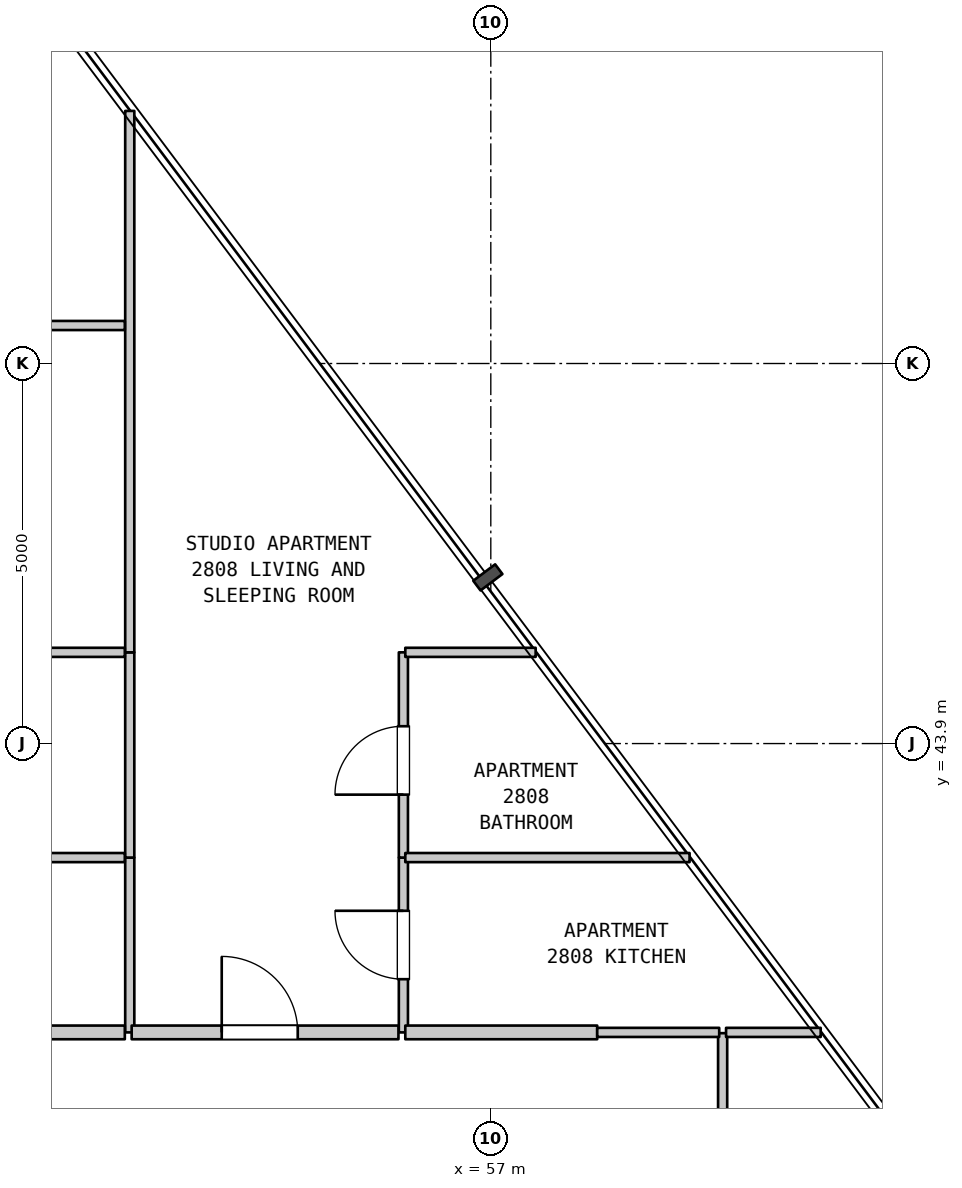
"""IFC4 building model, lengths in metres.
Left out: names, types, materials, properties, quantities, classifications, styles, units other than length and angle.
Written with IfcOpenShell. Run it as: python <this file> out.ifc"""

import sys

from ifc_helpers import new_model, si_unit, direction, frame, frame_2d, origin, place, context, subcontext, project, spatial, rectangle, extrude, element, fill, save


model = new_model("IFC4")
c1 = context("Model", 3, precision=1e-05, world=origin(), true_north=direction((0.0, 1.0)))
c2 = subcontext(c1, "Body", "Model", "MODEL_VIEW")
j1 = project(units=[si_unit("LENGTHUNIT", "METRE"), si_unit("PLANEANGLEUNIT", "RADIAN")], contexts=[c1])
p1 = place(None, origin())
s1 = spatial("IfcSite", under=j1, at=p1, CompositionType="ELEMENT")
p2 = place(p1, origin())
s2 = spatial("IfcBuilding", under=s1, at=p2, CompositionType="ELEMENT")
p3 = place(p2, frame((0.0, 0.0, 116.8)))
s3 = spatial("IfcBuildingStorey", under=s2, at=p3, CompositionType="ELEMENT", Elevation=116.8)
p4 = place(p3, frame((52.25, 40.1, 0.0), z_axis=(0.0, 0.0, 1.0), x_axis=(0.0, 1.0, 0.0)))
e1 = element("IfcWall", 1, at=p4, inside=s3, PredefinedType="PARTITIONING", context=c2, shape_type="SweptSolid", body=[
    extrude(rectangle(XDim=2.3, YDim=0.12, at=frame_2d((1.15, 0.0))), origin(), (0.0, 0.0, 1.0), 3.38),
])
p5 = place(p3, frame((52.25, 42.4, 0.0), z_axis=(0.0, 0.0, 1.0), x_axis=(0.0, 1.0, 0.0)))
e2 = element("IfcWall", 2, at=p5, inside=s3, PredefinedType="PARTITIONING", context=c2, shape_type="SweptSolid", body=[
    extrude(rectangle(XDim=2.7, YDim=0.12, at=frame_2d((1.35, 0.0))), origin(), (0.0, 0.0, 1.0), 3.38),
])
p6 = place(p3, frame((52.25, 45.1, 0.0), z_axis=(0.0, 0.0, 1.0), x_axis=(0.0, 1.0, 0.0)))
e3 = element("IfcWall", 3, at=p6, inside=s3, PredefinedType="PARTITIONING", context=c2, shape_type="SweptSolid", body=[
    extrude(rectangle(XDim=7.123, YDim=0.12, at=frame_2d((3.562, 0.0))), origin(), (0.0, 0.0, 1.0), 3.38),
])
p7 = place(p3, frame((55.85, 40.1, 0.0), z_axis=(0.0, 0.0, 1.0), x_axis=(0.0, 1.0, 0.0)))
e4 = element("IfcWall", 4, at=p7, inside=s3, PredefinedType="PARTITIONING", context=c2, shape_type="SweptSolid", body=[
    extrude(rectangle(XDim=2.3, YDim=0.12, at=frame_2d((1.15, 0.0))), origin(), (0.0, 0.0, 1.0), 3.38),
])
p8 = place(p7, frame((0.7, 0.0, 0.0)))
e5 = element("IfcOpeningElement", 5, at=p8, cuts=e4, PredefinedType="OPENING", context=c2, shape_type="SweptSolid", body=[
    extrude(rectangle(XDim=0.9, YDim=2.15, at=frame_2d((0.45, 1.075))), frame((0.0, 0.07, 0.0), z_axis=(0.0, -1.0, 0.0), x_axis=(1.0, 0.0, 0.0)), (0.0, 0.0, 1.0), 0.14),
])
p9 = place(p3, frame((55.85, 42.4, 0.0), z_axis=(0.0, 0.0, 1.0), x_axis=(0.0, 1.0, 0.0)))
e6 = element("IfcWall", 6, at=p9, inside=s3, PredefinedType="PARTITIONING", context=c2, shape_type="SweptSolid", body=[
    extrude(rectangle(XDim=2.7, YDim=0.12, at=frame_2d((1.35, 0.0))), origin(), (0.0, 0.0, 1.0), 3.38),
])
p10 = place(p9, frame((0.828, 0.0, 0.0)))
e7 = element("IfcOpeningElement", 7, at=p10, cuts=e6, PredefinedType="OPENING", context=c2, shape_type="SweptSolid", body=[
    extrude(rectangle(XDim=0.9, YDim=2.1, at=frame_2d((0.45, 1.05))), frame((0.0, 0.07, 0.0), z_axis=(0.0, -1.0, 0.0), x_axis=(1.0, 0.0, 0.0)), (0.0, 0.0, 1.0), 0.14),
])
p11 = place(p3, frame((60.05, 37.89, 0.0), z_axis=(0.0, 0.0, 1.0), x_axis=(0.0, 1.0, 0.0)))
e8 = element("IfcWall", 8, at=p11, inside=s3, PredefinedType="PARTITIONING", context=c2, shape_type="SweptSolid", body=[
    extrude(rectangle(XDim=2.2, YDim=0.12, at=frame_2d((1.1, 0.0))), origin(), (0.0, 0.0, 1.0), 3.38),
])
p12 = place(p3, frame((46.845, 40.1, 0.0), z_axis=(0.0, 0.0, 1.0), x_axis=(1.0, 0.0, 0.0)))
e9 = element("IfcWall", 9, at=p12, inside=s3, PredefinedType="STANDARD", context=c2, shape_type="SweptSolid", body=[
    extrude(rectangle(XDim=5.34, YDim=0.18, at=frame_2d((2.67, 0.0))), origin(), (0.0, 0.0, 1.0), 3.38),
])
p13 = place(p3, frame((52.275, 40.1, 0.0), z_axis=(0.0, 0.0, 1.0), x_axis=(1.0, 0.0, 0.0)))
e10 = element("IfcWall", 10, at=p13, inside=s3, PredefinedType="STANDARD", context=c2, shape_type="SweptSolid", body=[
    extrude(rectangle(XDim=3.51, YDim=0.18, at=frame_2d((1.755, 0.0))), origin(), (0.0, 0.0, 1.0), 3.38),
])
p14 = place(p13, frame((1.185, 0.0, 0.0)))
e11 = element("IfcOpeningElement", 11, at=p14, cuts=e10, PredefinedType="OPENING", context=c2, shape_type="SweptSolid", body=[
    extrude(rectangle(XDim=1.0, YDim=2.15, at=frame_2d((0.5, 1.075))), frame((0.0, 0.1, 0.0), z_axis=(0.0, -1.0, 0.0), x_axis=(1.0, 0.0, 0.0)), (0.0, 0.0, 1.0), 0.2),
])
p15 = place(p3, frame((55.875, 40.1, 0.0), z_axis=(0.0, 0.0, 1.0), x_axis=(1.0, 0.0, 0.0)))
e12 = element("IfcWall", 12, at=p15, inside=s3, PredefinedType="STANDARD", context=c2, shape_type="SweptSolid", body=[
    extrude(rectangle(XDim=2.525, YDim=0.18, at=frame_2d((1.262, 0.0))), origin(), (0.0, 0.0, 1.0), 3.38),
])
p16 = place(p3, frame((58.4, 40.1, 0.0), z_axis=(0.0, 0.0, 1.0), x_axis=(1.0, 0.0, 0.0)))
e13 = element("IfcWall", 13, at=p16, inside=s3, PredefinedType="PARTITIONING", context=c2, shape_type="SweptSolid", body=[
    extrude(rectangle(XDim=1.605, YDim=0.12, at=frame_2d((0.802, 0.0))), origin(), (0.0, 0.0, 1.0), 3.38),
])
p17 = place(p3, frame((60.095, 40.1, 0.0), z_axis=(0.0, 0.0, 1.0), x_axis=(1.0, 0.0, 0.0)))
e14 = element("IfcWall", 14, at=p17, inside=s3, PredefinedType="PARTITIONING", context=c2, shape_type="SweptSolid", body=[
    extrude(rectangle(XDim=1.245, YDim=0.12, at=frame_2d((0.623, 0.0))), origin(), (0.0, 0.0, 1.0), 3.38),
])
p18 = place(p3, frame((46.845, 42.4, 0.0), z_axis=(0.0, 0.0, 1.0), x_axis=(1.0, 0.0, 0.0)))
e15 = element("IfcWall", 15, at=p18, inside=s3, PredefinedType="PARTITIONING", context=c2, shape_type="SweptSolid", body=[
    extrude(rectangle(XDim=5.34, YDim=0.12, at=frame_2d((2.67, 0.0))), origin(), (0.0, 0.0, 1.0), 3.38),
])
p19 = place(p3, frame((55.875, 42.4, 0.0), z_axis=(0.0, 0.0, 1.0), x_axis=(1.0, 0.0, 0.0)))
e16 = element("IfcWall", 16, at=p19, inside=s3, PredefinedType="PARTITIONING", context=c2, shape_type="SweptSolid", body=[
    extrude(rectangle(XDim=3.74, YDim=0.12, at=frame_2d((1.87, 0.0))), origin(), (0.0, 0.0, 1.0), 3.38),
])
p20 = place(p3, frame((46.845, 45.1, 0.0), z_axis=(0.0, 0.0, 1.0), x_axis=(1.0, 0.0, 0.0)))
e17 = element("IfcWall", 17, at=p20, inside=s3, PredefinedType="PARTITIONING", context=c2, shape_type="SweptSolid", body=[
    extrude(rectangle(XDim=5.34, YDim=0.12, at=frame_2d((2.67, 0.0))), origin(), (0.0, 0.0, 1.0), 3.38),
])
p21 = place(p3, frame((55.875, 45.1, 0.0), z_axis=(0.0, 0.0, 1.0), x_axis=(1.0, 0.0, 0.0)))
e18 = element("IfcWall", 18, at=p21, inside=s3, PredefinedType="PARTITIONING", context=c2, shape_type="SweptSolid", body=[
    extrude(rectangle(XDim=1.715, YDim=0.12, at=frame_2d((0.857, 0.0))), origin(), (0.0, 0.0, 1.0), 3.38),
])
p22 = place(p3, frame((46.845, 49.4, 0.0), z_axis=(0.0, 0.0, 1.0), x_axis=(1.0, 0.0, 0.0)))
e19 = element("IfcWall", 19, at=p22, inside=s3, PredefinedType="PARTITIONING", context=c2, shape_type="SweptSolid", body=[
    extrude(rectangle(XDim=5.34, YDim=0.12, at=frame_2d((2.67, 0.0))), origin(), (0.0, 0.0, 1.0), 3.38),
])
p23 = place(p8, origin())
e20 = element("IfcDoor", 20, at=p23, inside=s3, OperationType="SINGLE_SWING_RIGHT", PredefinedType="DOOR", context=c2, shape_type="SweptSolid", body=[
    extrude(rectangle(XDim=0.9, YDim=2.15, at=frame_2d((0.45, 1.075))), frame((0.0, 0.025, 0.0), z_axis=(0.0, -1.0, 0.0), x_axis=(1.0, 0.0, 0.0)), (0.0, 0.0, 1.0), 0.05),
])
fill(e5, e20)
p24 = place(p10, origin())
e21 = element("IfcDoor", 21, at=p24, inside=s3, OperationType="SINGLE_SWING_LEFT", PredefinedType="DOOR", context=c2, shape_type="SweptSolid", body=[
    extrude(rectangle(XDim=0.9, YDim=2.1, at=frame_2d((0.45, 1.05))), frame((0.0, 0.025, 0.0), z_axis=(0.0, -1.0, 0.0), x_axis=(1.0, 0.0, 0.0)), (0.0, 0.0, 1.0), 0.05),
])
fill(e7, e21)
p25 = place(p14, origin())
e22 = element("IfcDoor", 22, at=p25, inside=s3, OperationType="SINGLE_SWING_LEFT", PredefinedType="DOOR", context=c2, shape_type="SweptSolid", body=[
    extrude(rectangle(XDim=1.0, YDim=2.15, at=frame_2d((0.5, 1.075))), frame((0.0, 0.025, 0.0), z_axis=(0.0, -1.0, 0.0), x_axis=(1.0, 0.0, 0.0)), (0.0, 0.0, 1.0), 0.05),
])
fill(e11, e22)
save(model, sys.argv[1])
